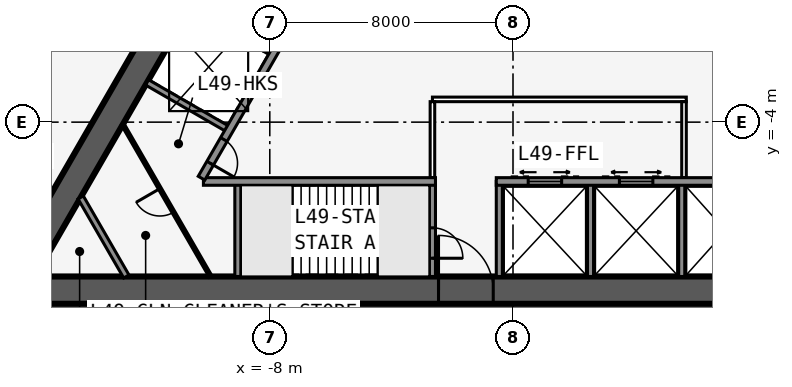
"""IFC4 building model, lengths in metres.
Left out: names, types, materials, properties, quantities, classifications, styles, units other than length and angle.
Written with IfcOpenShell. Run it as: python <this file> out.ifc"""

import sys

from ifc_helpers import new_model, si_unit, direction, frame, frame_2d, origin, place, context, subcontext, project, spatial, rectangle, extrude, element, fill, save


model = new_model("IFC4")
c1 = context("Model", 3, precision=1e-05, world=origin(), true_north=direction((0.0, 1.0)))
c2 = subcontext(c1, "Body", "Model", "MODEL_VIEW")
j1 = project(units=[si_unit("LENGTHUNIT", "METRE"), si_unit("PLANEANGLEUNIT", "RADIAN")], contexts=[c1])
p1 = place(None, origin())
s1 = spatial("IfcSite", under=j1, at=p1, CompositionType="ELEMENT")
p2 = place(p1, origin())
s2 = spatial("IfcBuilding", under=s1, at=p2, CompositionType="ELEMENT")
p3 = place(p2, frame((0.0, 0.0, 182.7)))
s3 = spatial("IfcBuildingStorey", under=s2, at=p3, CompositionType="ELEMENT", Elevation=182.7)
p4 = place(p3, frame((-16.5, -9.526, 0.0), z_axis=(0.0, 0.0, 1.0), x_axis=(1.0, 0.0, 0.0)))
e1 = element("IfcWall", 1, at=p4, inside=s3, PredefinedType="SHEAR", context=c2, shape_type="SweptSolid", body=[
    extrude(rectangle(XDim=33.0, YDim=0.9, at=frame_2d((16.5, 0.0))), origin(), (0.0, 0.0, 1.0), 3.4),
])
p5 = place(p4, frame((14.05, 0.0, 0.0)))
e2 = element("IfcOpeningElement", 2, at=p5, cuts=e1, PredefinedType="OPENING", context=c2, shape_type="SweptSolid", body=[
    extrude(rectangle(XDim=1.8, YDim=2.13, at=frame_2d((0.9, 1.065))), frame((0.0, 0.46, 0.0), z_axis=(0.0, -1.0, 0.0), x_axis=(1.0, 0.0, 0.0)), (0.0, 0.0, 1.0), 0.92),
])
p6 = place(p3, frame((-10.183, -5.951, 0.0), z_axis=(0.0, 0.0, 1.0), x_axis=(1.0, 0.0, 0.0)))
e3 = element("IfcWall", 3, at=p6, inside=s3, PredefinedType="SOLIDWALL", context=c2, shape_type="SweptSolid", body=[
    extrude(rectangle(XDim=7.633, YDim=0.25, at=frame_2d((3.816, 0.0))), origin(), (0.0, 0.0, 1.0), 3.235),
])
p7 = place(p3, frame((-0.55, -5.951, 0.0), z_axis=(0.0, 0.0, 1.0), x_axis=(1.0, 0.0, 0.0)))
e4 = element("IfcWall", 4, at=p7, inside=s3, PredefinedType="SOLIDWALL", context=c2, shape_type="SweptSolid", body=[
    extrude(rectangle(XDim=10.733, YDim=0.25, at=frame_2d((5.366, 0.0))), origin(), (0.0, 0.0, 1.0), 3.235),
])
p8 = place(p7, frame((9.314, 0.0, 0.0)))
e5 = element("IfcOpeningElement", 5, at=p8, cuts=e4, PredefinedType="OPENING", context=c2, shape_type="SweptSolid", body=[
    extrude(rectangle(XDim=0.9, YDim=2.13, at=frame_2d((0.45, 1.065))), frame((0.0, 0.135, 0.0), z_axis=(0.0, -1.0, 0.0), x_axis=(1.0, 0.0, 0.0)), (0.0, 0.0, 1.0), 0.27),
])
p9 = place(p7, frame((1.05, 0.0, 0.0)))
e6 = element("IfcOpeningElement", 6, at=p9, cuts=e4, PredefinedType="OPENING", context=c2, shape_type="SweptSolid", body=[
    extrude(rectangle(XDim=1.1, YDim=2.13, at=frame_2d((0.55, 1.065))), frame((0.0, 0.135, 0.0), z_axis=(0.0, -1.0, 0.0), x_axis=(1.0, 0.0, 0.0)), (0.0, 0.0, 1.0), 0.27),
])
p10 = place(p7, frame((4.05, 0.0, 0.0)))
e7 = element("IfcOpeningElement", 7, at=p10, cuts=e4, PredefinedType="OPENING", context=c2, shape_type="SweptSolid", body=[
    extrude(rectangle(XDim=1.1, YDim=2.13, at=frame_2d((0.55, 1.065))), frame((0.0, 0.135, 0.0), z_axis=(0.0, -1.0, 0.0), x_axis=(1.0, 0.0, 0.0)), (0.0, 0.0, 1.0), 0.27),
])
p11 = place(p3, frame((-9.05, -5.951, 0.0), z_axis=(0.0, 0.0, 1.0), x_axis=(0.0, -1.0, 0.0)))
e8 = element("IfcWall", 8, at=p11, inside=s3, PredefinedType="SOLIDWALL", context=c2, shape_type="SweptSolid", body=[
    extrude(rectangle(XDim=3.125, YDim=0.2, at=frame_2d((1.562, 0.0))), origin(), (0.0, 0.0, 1.0), 3.235),
])
p12 = place(p3, frame((-2.65, -5.951, 0.0), z_axis=(0.0, 0.0, 1.0), x_axis=(0.0, -1.0, 0.0)))
e9 = element("IfcWall", 9, at=p12, inside=s3, PredefinedType="SOLIDWALL", context=c2, shape_type="SweptSolid", body=[
    extrude(rectangle(XDim=3.125, YDim=0.2, at=frame_2d((1.562, 0.0))), origin(), (0.0, 0.0, 1.0), 3.235),
])
p13 = place(p12, frame((1.525, 0.0, 0.0)))
e10 = element("IfcOpeningElement", 10, at=p13, cuts=e9, PredefinedType="OPENING", context=c2, shape_type="SweptSolid", body=[
    extrude(rectangle(XDim=1.0, YDim=2.13, at=frame_2d((0.5, 1.065))), frame((0.0, 0.11, 0.0), z_axis=(0.0, -1.0, 0.0), x_axis=(1.0, 0.0, 0.0)), (0.0, 0.0, 1.0), 0.22),
])
for number, where, z_axis, x_axis in (
    (11, (-0.45, -5.951, 0.0), (0.0, 0.0, 1.0), (0.0, -1.0, 0.0)),
    (12, (2.55, -5.951, 0.0), (0.0, 0.0, 1.0), (0.0, -1.0, 0.0)),
    (13, (5.55, -5.951, 0.0), (0.0, 0.0, 1.0), (0.0, -1.0, 0.0)),
):
    element("IfcWall", number, at=place(p3, frame(where, z_axis=z_axis, x_axis=x_axis)), inside=s3, PredefinedType="SOLIDWALL", context=c2, shape_type="SweptSolid", body=[
        extrude(rectangle(XDim=3.125, YDim=0.2, at=frame_2d((1.562, 0.0))), origin(), (0.0, 0.0, 1.0), 3.235),
    ])
p14 = place(p3, frame((16.5, -9.526, 0.0), z_axis=(0.0, 0.0, 1.0), x_axis=(-0.499999749417, 0.866025548458, 0.0)))
e14 = element("IfcWall", 14, at=p14, inside=s3, PredefinedType="SHEAR", context=c2, shape_type="SweptSolid", body=[
    extrude(rectangle(XDim=33.0, YDim=0.9, at=frame_2d((16.5, 0.0))), origin(), (0.0, 0.0, 1.0), 3.4),
])
p15 = place(p14, frame((14.15, 0.0, 0.0)))
e15 = element("IfcOpeningElement", 15, at=p15, cuts=e14, PredefinedType="OPENING", context=c2, shape_type="SweptSolid", body=[
    extrude(rectangle(XDim=1.8, YDim=2.13, at=frame_2d((0.9, 1.065))), frame((0.0, 0.46, 0.0), z_axis=(0.0, -1.0, 0.0), x_axis=(1.0, 0.0, 0.0)), (0.0, 0.0, 1.0), 0.92),
])
p16 = place(p14, frame((12.6, 0.0, 0.0)))
e16 = element("IfcOpeningElement", 16, at=p16, cuts=e14, PredefinedType="OPENING", context=c2, shape_type="SweptSolid", body=[
    extrude(rectangle(XDim=1.0, YDim=2.13, at=frame_2d((0.5, 1.065))), frame((0.0, 0.46, 0.0), z_axis=(0.0, -1.0, 0.0), x_axis=(1.0, 0.0, 0.0)), (0.0, 0.0, 1.0), 0.92),
])
p17 = place(p3, frame((10.245, -5.843, 0.0), z_axis=(0.0, 0.0, 1.0), x_axis=(-0.499993009313, 0.866029439822, 0.0)))
e17 = element("IfcWall", 17, at=p17, inside=s3, PredefinedType="SOLIDWALL", context=c2, shape_type="SweptSolid", body=[
    extrude(rectangle(XDim=7.733, YDim=0.25, at=frame_2d((3.866, 0.0))), origin(), (0.0, 0.0, 1.0), 3.235),
])
p18 = place(p3, frame((0.0, 19.052, 0.0), z_axis=(0.0, 0.0, 1.0), x_axis=(-0.499999749417, -0.866025548458, 0.0)))
e18 = element("IfcWall", 18, at=p18, inside=s3, PredefinedType="SHEAR", context=c2, shape_type="SweptSolid", body=[
    extrude(rectangle(XDim=33.0, YDim=0.9, at=frame_2d((16.5, 0.0))), origin(), (0.0, 0.0, 1.0), 3.4),
])
p19 = place(p18, frame((14.15, 0.0, 0.0)))
e19 = element("IfcOpeningElement", 19, at=p19, cuts=e18, PredefinedType="OPENING", context=c2, shape_type="SweptSolid", body=[
    extrude(rectangle(XDim=1.8, YDim=2.13, at=frame_2d((0.9, 1.065))), frame((0.0, 0.46, 0.0), z_axis=(0.0, -1.0, 0.0), x_axis=(1.0, 0.0, 0.0)), (0.0, 0.0, 1.0), 0.92),
])
p20 = place(p18, frame((12.6, 0.0, 0.0)))
e20 = element("IfcOpeningElement", 20, at=p20, cuts=e18, PredefinedType="OPENING", context=c2, shape_type="SweptSolid", body=[
    extrude(rectangle(XDim=1.0, YDim=2.13, at=frame_2d((0.5, 1.065))), frame((0.0, 0.46, 0.0), z_axis=(0.0, -1.0, 0.0), x_axis=(1.0, 0.0, 0.0)), (0.0, 0.0, 1.0), 0.92),
])
p21 = place(p3, frame((-4.929, 3.365, 0.0), z_axis=(0.0, 0.0, 1.0), x_axis=(-0.499991433582, -0.866030349552, 0.0)))
e21 = element("IfcWall", 21, at=p21, inside=s3, PredefinedType="SOLIDWALL", context=c2, shape_type="SweptSolid", body=[
    extrude(rectangle(XDim=10.633, YDim=0.25, at=frame_2d((5.316, 0.0))), origin(), (0.0, 0.0, 1.0), 3.235),
])
p22 = place(p21, frame((9.164, 0.0, 0.0)))
e22 = element("IfcOpeningElement", 22, at=p22, cuts=e21, PredefinedType="OPENING", context=c2, shape_type="SweptSolid", body=[
    extrude(rectangle(XDim=0.9, YDim=2.13, at=frame_2d((0.45, 1.065))), frame((0.0, 0.135, 0.0), z_axis=(0.0, -1.0, 0.0), x_axis=(1.0, 0.0, 0.0)), (0.0, 0.0, 1.0), 0.27),
])
for number, where, z_axis, x_axis in (
    (23, (-7.879, -1.744, 0.0), (0.0, 0.0, 1.0), (-0.866, 0.5, 0.0)),
    (24, (-9.329, -4.256, 0.0), (0.0, 0.0, 1.0), (-0.866, 0.5, 0.0)),
):
    element("IfcWall", number, at=place(p3, frame(where, z_axis=z_axis, x_axis=x_axis)), inside=s3, PredefinedType="SOLIDWALL", context=c2, shape_type="SweptSolid", body=[
        extrude(rectangle(XDim=3.125, YDim=0.2, at=frame_2d((1.562, 0.0))), origin(), (0.0, 0.0, 1.0), 3.235),
    ])
p23 = place(p3, frame((20.027, -10.985, 0.0), z_axis=(0.0, 0.0, 1.0), x_axis=(-0.500001677587, 0.866024435227, 0.0)))
e25 = element("IfcWall", 25, at=p23, inside=s3, PredefinedType="PARTITIONING", context=c2, shape_type="SweptSolid", body=[
    extrude(rectangle(XDim=39.054, YDim=0.15, at=frame_2d((19.527, 0.0))), origin(), (0.0, 0.0, 1.0), 3.235),
])
p24 = place(p23, frame((1.558, 0.0, 0.0)))
e26 = element("IfcOpeningElement", 26, at=p24, cuts=e25, PredefinedType="OPENING", context=c2, shape_type="SweptSolid", body=[
    extrude(rectangle(XDim=0.95, YDim=2.13, at=frame_2d((0.475, 1.065))), frame((0.0, 0.085, 0.0), z_axis=(0.0, -1.0, 0.0), x_axis=(1.0, 0.0, 0.0)), (0.0, 0.0, 1.0), 0.17),
])
p25 = place(p23, frame((12.752, 0.0, 0.0)))
e27 = element("IfcOpeningElement", 27, at=p25, cuts=e25, PredefinedType="OPENING", context=c2, shape_type="SweptSolid", body=[
    extrude(rectangle(XDim=0.95, YDim=2.13, at=frame_2d((0.475, 1.065))), frame((0.0, 0.085, 0.0), z_axis=(0.0, -1.0, 0.0), x_axis=(1.0, 0.0, 0.0)), (0.0, 0.0, 1.0), 0.17),
])
p26 = place(p23, frame((26.552, 0.0, 0.0)))
e28 = element("IfcOpeningElement", 28, at=p26, cuts=e25, PredefinedType="OPENING", context=c2, shape_type="SweptSolid", body=[
    extrude(rectangle(XDim=0.95, YDim=2.13, at=frame_2d((0.475, 1.065))), frame((0.0, 0.085, 0.0), z_axis=(0.0, -1.0, 0.0), x_axis=(1.0, 0.0, 0.0)), (0.0, 0.0, 1.0), 0.17),
])
p27 = place(p23, frame((37.752, 0.0, 0.0)))
e29 = element("IfcOpeningElement", 29, at=p27, cuts=e25, PredefinedType="OPENING", context=c2, shape_type="SweptSolid", body=[
    extrude(rectangle(XDim=0.95, YDim=2.13, at=frame_2d((0.475, 1.065))), frame((0.0, 0.085, 0.0), z_axis=(0.0, -1.0, 0.0), x_axis=(1.0, 0.0, 0.0)), (0.0, 0.0, 1.0), 0.17),
])
p28 = place(p3, frame((-0.5, 24.636, 0.0), z_axis=(0.0, 0.0, 1.0), x_axis=(-0.500001915564, -0.86602429783, 0.0)))
e30 = element("IfcWall", 30, at=p28, inside=s3, PredefinedType="PARTITIONING", context=c2, shape_type="SweptSolid", body=[
    extrude(rectangle(XDim=42.172, YDim=0.15, at=frame_2d((21.086, 0.0))), origin(), (0.0, 0.0, 1.0), 3.235),
])
p29 = place(p28, frame((2.338, 0.0, 0.0)))
e31 = element("IfcOpeningElement", 31, at=p29, cuts=e30, PredefinedType="OPENING", context=c2, shape_type="SweptSolid", body=[
    extrude(rectangle(XDim=0.95, YDim=2.13, at=frame_2d((0.475, 1.065))), frame((0.0, 0.085, 0.0), z_axis=(0.0, -1.0, 0.0), x_axis=(1.0, 0.0, 0.0)), (0.0, 0.0, 1.0), 0.17),
])
p30 = place(p28, frame((18.111, 0.0, 0.0)))
e32 = element("IfcOpeningElement", 32, at=p30, cuts=e30, PredefinedType="OPENING", context=c2, shape_type="SweptSolid", body=[
    extrude(rectangle(XDim=0.95, YDim=2.13, at=frame_2d((0.475, 1.065))), frame((0.0, 0.085, 0.0), z_axis=(0.0, -1.0, 0.0), x_axis=(1.0, 0.0, 0.0)), (0.0, 0.0, 1.0), 0.17),
])
p31 = place(p28, frame((28.111, 0.0, 0.0)))
e33 = element("IfcOpeningElement", 33, at=p31, cuts=e30, PredefinedType="OPENING", context=c2, shape_type="SweptSolid", body=[
    extrude(rectangle(XDim=0.95, YDim=2.13, at=frame_2d((0.475, 1.065))), frame((0.0, 0.085, 0.0), z_axis=(0.0, -1.0, 0.0), x_axis=(1.0, 0.0, 0.0)), (0.0, 0.0, 1.0), 0.17),
])
p32 = place(p28, frame((39.311, 0.0, 0.0)))
e34 = element("IfcOpeningElement", 34, at=p32, cuts=e30, PredefinedType="OPENING", context=c2, shape_type="SweptSolid", body=[
    extrude(rectangle(XDim=0.95, YDim=2.13, at=frame_2d((0.475, 1.065))), frame((0.0, 0.085, 0.0), z_axis=(0.0, -1.0, 0.0), x_axis=(1.0, 0.0, 0.0)), (0.0, 0.0, 1.0), 0.17),
])
p33 = place(p3, frame((-2.65, -3.251, 0.0), z_axis=(0.0, 0.0, 1.0), x_axis=(1.0, 0.0, 0.0)))
e35 = element("IfcWall", 35, at=p33, inside=s3, PredefinedType="PARTITIONING", context=c2, shape_type="SweptSolid", body=[
    extrude(rectangle(XDim=8.35, YDim=0.15, at=frame_2d((4.175, 0.0))), origin(), (0.0, 0.0, 1.0), 3.235),
])
for number, where, z_axis, x_axis in (
    (36, (-2.65, -5.826, 0.0), (0.0, 0.0, 1.0), (0.0, 1.0, 0.0)),
    (37, (5.625, -5.826, 0.0), (0.0, 0.0, 1.0), (0.0, 1.0, 0.0)),
):
    element("IfcWall", number, at=place(p3, frame(where, z_axis=z_axis, x_axis=x_axis)), inside=s3, PredefinedType="PARTITIONING", context=c2, shape_type="SweptSolid", body=[
        extrude(rectangle(XDim=2.5, YDim=0.15, at=frame_2d((1.25, 0.0))), origin(), (0.0, 0.0, 1.0), 3.235),
    ])
p34 = place(p3, frame((-12.719, -9.076, 0.0), z_axis=(0.0, 0.0, 1.0), x_axis=(-0.499952404951, 0.866052881055, 0.0)))
e38 = element("IfcWall", 38, at=p34, inside=s3, PredefinedType="SOLIDWALL", context=c2, shape_type="SweptSolid", body=[
    extrude(rectangle(XDim=3.002, YDim=0.2, at=frame_2d((1.501, 0.0))), origin(), (0.0, 0.0, 1.0), 3.235),
])
p35 = place(p3, frame((-9.947, -9.076, 0.0), z_axis=(0.0, 0.0, 1.0), x_axis=(-0.500027479704, 0.866009537788, 0.0)))
e39 = element("IfcWall", 39, at=p35, inside=s3, PredefinedType="PARTITIONING", context=c2, shape_type="SweptSolid", body=[
    extrude(rectangle(XDim=5.774, YDim=0.1, at=frame_2d((2.887, 0.0))), origin(), (0.0, 0.0, 1.0), 3.235),
])
p36 = place(p35, frame((2.437, 0.0, 0.0)))
e40 = element("IfcOpeningElement", 40, at=p36, cuts=e39, PredefinedType="OPENING", context=c2, shape_type="SweptSolid", body=[
    extrude(rectangle(XDim=0.9, YDim=2.13, at=frame_2d((0.45, 1.065))), frame((0.0, 0.06, 0.0), z_axis=(0.0, -1.0, 0.0), x_axis=(1.0, 0.0, 0.0)), (0.0, 0.0, 1.0), 0.12),
])
p37 = place(p3, frame((-7.247, -7.576, 0.0), z_axis=(0.0, 0.0, 1.0), x_axis=(1.0, 0.0, 0.0)))
e41 = element("IfcWall", 41, at=p37, inside=s3, PredefinedType="SOLIDWALL", context=c2, shape_type="SweptSolid", body=[
    extrude(rectangle(XDim=2.794, YDim=0.1, at=frame_2d((1.397, 0.0))), origin(), (0.0, 0.0, 1.0), 3.4),
])
p38 = place(p5, origin())
e42 = element("IfcDoor", 42, at=p38, inside=s3, OperationType="DOUBLE_DOOR_SINGLE_SWING", PredefinedType="DOOR", context=c2, shape_type="SweptSolid", body=[
    extrude(rectangle(XDim=1.8, YDim=2.13, at=frame_2d((0.9, 1.065))), frame((0.0, 0.025, 0.0), z_axis=(0.0, -1.0, 0.0), x_axis=(1.0, 0.0, 0.0)), (0.0, 0.0, 1.0), 0.05),
])
fill(e2, e42)
p39 = place(p13, origin())
e43 = element("IfcDoor", 43, at=p39, inside=s3, OperationType="SINGLE_SWING_RIGHT", PredefinedType="DOOR", context=c2, shape_type="SweptSolid", body=[
    extrude(rectangle(XDim=1.0, YDim=2.13, at=frame_2d((0.5, 1.065))), frame((0.0, 0.025, 0.0), z_axis=(0.0, -1.0, 0.0), x_axis=(1.0, 0.0, 0.0)), (0.0, 0.0, 1.0), 0.05),
])
fill(e10, e43)
p40 = place(p36, origin())
e44 = element("IfcDoor", 44, at=p40, inside=s3, OperationType="SINGLE_SWING_RIGHT", PredefinedType="DOOR", context=c2, shape_type="SweptSolid", body=[
    extrude(rectangle(XDim=0.9, YDim=2.13, at=frame_2d((0.45, 1.065))), frame((0.0, 0.025, 0.0), z_axis=(0.0, -1.0, 0.0), x_axis=(1.0, 0.0, 0.0)), (0.0, 0.0, 1.0), 0.05),
])
fill(e40, e44)
p41 = place(p22, origin())
e45 = element("IfcDoor", 45, at=p41, inside=s3, OperationType="SINGLE_SWING_RIGHT", PredefinedType="DOOR", context=c2, shape_type="SweptSolid", body=[
    extrude(rectangle(XDim=0.9, YDim=2.13, at=frame_2d((0.45, 1.065))), frame((0.0, 0.025, 0.0), z_axis=(0.0, -1.0, 0.0), x_axis=(1.0, 0.0, 0.0)), (0.0, 0.0, 1.0), 0.05),
])
fill(e22, e45)
p42 = place(p9, origin())
e46 = element("IfcDoor", 46, at=p42, inside=s3, OperationType="DOUBLE_DOOR_SLIDING", PredefinedType="USERDEFINED", context=c2, shape_type="SweptSolid", body=[
    extrude(rectangle(XDim=1.1, YDim=2.13, at=frame_2d((0.55, 1.065))), frame((0.0, 0.025, 0.0), z_axis=(0.0, -1.0, 0.0), x_axis=(1.0, 0.0, 0.0)), (0.0, 0.0, 1.0), 0.05),
])
fill(e6, e46)
p43 = place(p10, origin())
e47 = element("IfcDoor", 47, at=p43, inside=s3, OperationType="DOUBLE_DOOR_SLIDING", PredefinedType="USERDEFINED", context=c2, shape_type="SweptSolid", body=[
    extrude(rectangle(XDim=1.1, YDim=2.13, at=frame_2d((0.55, 1.065))), frame((0.0, 0.025, 0.0), z_axis=(0.0, -1.0, 0.0), x_axis=(1.0, 0.0, 0.0)), (0.0, 0.0, 1.0), 0.05),
])
fill(e7, e47)
save(model, sys.argv[1])
